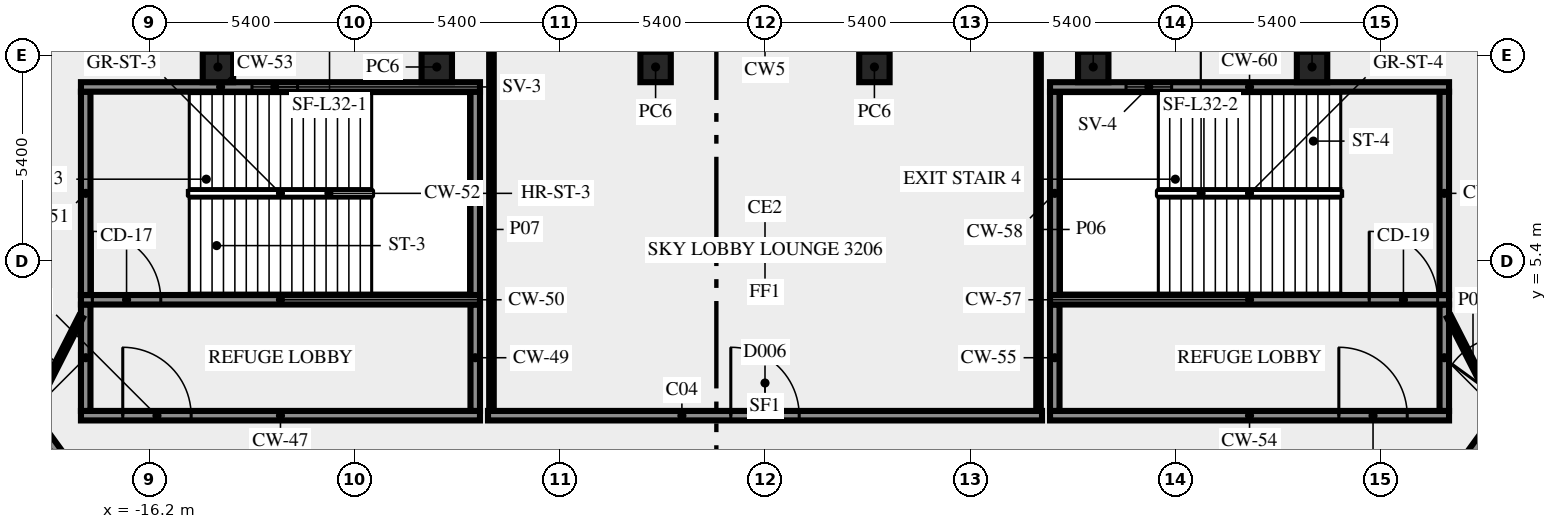
"""IFC4 building model, lengths in metres.
Left out: names, types, materials, properties, quantities, classifications, styles, units other than length and angle.
Written with IfcOpenShell. Run it as: python <this file> out.ifc"""

import sys

from ifc_helpers import new_model, si_unit, direction, frame, frame_2d, origin, origin_2d, place, context, subcontext, project, spatial, rectangle, extrude, element, fill, save


model = new_model("IFC4")
c1 = context("Model", 3, precision=1e-05, world=origin(), true_north=direction((0.0, 1.0)))
c2 = subcontext(c1, "Body", "Model", "MODEL_VIEW")
j1 = project(units=[si_unit("LENGTHUNIT", "METRE"), si_unit("PLANEANGLEUNIT", "RADIAN")], contexts=[c1])
p1 = place(None, origin())
s1 = spatial("IfcSite", under=j1, at=p1, CompositionType="ELEMENT")
p2 = place(p1, origin())
s2 = spatial("IfcBuilding", under=s1, at=p2, CompositionType="ELEMENT")
p3 = place(p2, frame((0.0, 0.0, 139.0)))
s3 = spatial("IfcBuildingStorey", under=s2, at=p3, CompositionType="ELEMENT", Elevation=139.0)
for number, where, z_axis, x_axis in (
    (1, (14.395, 10.5, 0.0), (0.0, 0.0, 1.0), (-1.0, 0.0, 0.0)),
    (2, (8.637, 10.5, 0.0), (0.0, 0.0, 1.0), (-1.0, 0.0, 0.0)),
    (3, (2.879, 10.5, 0.0), (0.0, 0.0, 1.0), (-1.0, 0.0, 0.0)),
    (4, (-2.879, 10.5, 0.0), (0.0, 0.0, 1.0), (-1.0, 0.0, 0.0)),
    (5, (-8.637, 10.5, 0.0), (0.0, 0.0, 1.0), (-1.0, 0.0, 0.0)),
    (6, (-14.395, 10.5, 0.0), (0.0, 0.0, 1.0), (-1.0, 0.0, 0.0)),
):
    element("IfcColumn", number, at=place(p3, frame(where, z_axis=z_axis, x_axis=x_axis)), inside=s3, PredefinedType="COLUMN", context=c2, shape_type="SweptSolid", body=[
        extrude(rectangle(XDim=0.8, YDim=0.8, at=origin_2d()), origin(), (0.0, 0.0, 1.0), 4.65),
    ])
p4 = place(p3, frame((-18.0, 1.325, 0.0), z_axis=(0.0, 0.0, 1.0), x_axis=(1.0, 0.0, 0.0)))
e7 = element("IfcWall", 7, at=p4, inside=s3, PredefinedType="SHEAR", context=c2, shape_type="SweptSolid", body=[
    extrude(rectangle(XDim=10.5, YDim=0.25, at=frame_2d((5.25, 0.0))), origin(), (0.0, 0.0, 1.0), 4.65),
])
p5 = place(p4, frame((1.1, 0.0, 0.0)))
e8 = element("IfcOpeningElement", 8, at=p5, cuts=e7, PredefinedType="OPENING", context=c2, shape_type="SweptSolid", body=[
    extrude(rectangle(XDim=1.8, YDim=2.1, at=frame_2d((0.9, 1.05))), frame((0.0, 0.135, 0.0), z_axis=(0.0, -1.0, 0.0), x_axis=(1.0, 0.0, 0.0)), (0.0, 0.0, 1.0), 0.27),
])
for number, where, z_axis, x_axis in (
    (9, (-17.875, 1.45, 0.0), (0.0, 0.0, 1.0), (0.0, 1.0, 0.0)),
    (10, (-7.625, 1.45, 0.0), (0.0, 0.0, 1.0), (0.0, 1.0, 0.0)),
):
    element("IfcWall", number, at=place(p3, frame(where, z_axis=z_axis, x_axis=x_axis)), inside=s3, PredefinedType="SHEAR", context=c2, shape_type="SweptSolid", body=[
        extrude(rectangle(XDim=2.8, YDim=0.25, at=frame_2d((1.4, 0.0))), origin(), (0.0, 0.0, 1.0), 4.65),
    ])
p6 = place(p3, frame((-18.0, 4.375, 0.0), z_axis=(0.0, 0.0, 1.0), x_axis=(1.0, 0.0, 0.0)))
e11 = element("IfcWall", 11, at=p6, inside=s3, PredefinedType="SHEAR", context=c2, shape_type="SweptSolid", body=[
    extrude(rectangle(XDim=10.5, YDim=0.25, at=frame_2d((5.25, 0.0))), origin(), (0.0, 0.0, 1.0), 4.65),
])
p7 = place(p6, frame((0.3, 0.0, 0.0)))
e12 = element("IfcOpeningElement", 12, at=p7, cuts=e11, PredefinedType="OPENING", context=c2, shape_type="SweptSolid", body=[
    extrude(rectangle(XDim=1.8, YDim=2.1, at=frame_2d((0.9, 1.05))), frame((0.0, 0.135, 0.0), z_axis=(0.0, -1.0, 0.0), x_axis=(1.0, 0.0, 0.0)), (0.0, 0.0, 1.0), 0.27),
])
for number, where, z_axis, x_axis in (
    (13, (-17.875, 4.5, 0.0), (0.0, 0.0, 1.0), (0.0, 1.0, 0.0)),
    (14, (-7.625, 4.5, 0.0), (0.0, 0.0, 1.0), (0.0, 1.0, 0.0)),
):
    element("IfcWall", number, at=place(p3, frame(where, z_axis=z_axis, x_axis=x_axis)), inside=s3, PredefinedType="SHEAR", context=c2, shape_type="SweptSolid", body=[
        extrude(rectangle(XDim=5.35, YDim=0.25, at=frame_2d((2.675, 0.0))), origin(), (0.0, 0.0, 1.0), 4.65),
    ])
p8 = place(p3, frame((-18.0, 9.975, 0.0), z_axis=(0.0, 0.0, 1.0), x_axis=(1.0, 0.0, 0.0)))
e15 = element("IfcWall", 15, at=p8, inside=s3, PredefinedType="SHEAR", context=c2, shape_type="SweptSolid", body=[
    extrude(rectangle(XDim=10.5, YDim=0.25, at=frame_2d((5.25, 0.0))), origin(), (0.0, 0.0, 1.0), 4.65),
])
p9 = place(p8, frame((4.5, 0.0, 1.0)))
e16 = element("IfcOpeningElement", 16, at=p9, cuts=e15, PredefinedType="OPENING", context=c2, shape_type="SweptSolid", body=[
    extrude(rectangle(XDim=1.2, YDim=1.2, at=frame_2d((0.6, 0.6))), frame((0.0, 0.135, 0.0), z_axis=(0.0, -1.0, 0.0), x_axis=(1.0, 0.0, 0.0)), (0.0, 0.0, 1.0), 0.27),
])
p10 = place(p3, frame((7.5, 1.325, 0.0), z_axis=(0.0, 0.0, 1.0), x_axis=(1.0, 0.0, 0.0)))
e17 = element("IfcWall", 17, at=p10, inside=s3, PredefinedType="SHEAR", context=c2, shape_type="SweptSolid", body=[
    extrude(rectangle(XDim=10.5, YDim=0.25, at=frame_2d((5.25, 0.0))), origin(), (0.0, 0.0, 1.0), 4.65),
])
p11 = place(p10, frame((7.6, 0.0, 0.0)))
e18 = element("IfcOpeningElement", 18, at=p11, cuts=e17, PredefinedType="OPENING", context=c2, shape_type="SweptSolid", body=[
    extrude(rectangle(XDim=1.8, YDim=2.1, at=frame_2d((0.9, 1.05))), frame((0.0, 0.135, 0.0), z_axis=(0.0, -1.0, 0.0), x_axis=(1.0, 0.0, 0.0)), (0.0, 0.0, 1.0), 0.27),
])
for number, where, z_axis, x_axis in (
    (19, (7.625, 1.45, 0.0), (0.0, 0.0, 1.0), (0.0, 1.0, 0.0)),
    (20, (17.875, 1.45, 0.0), (0.0, 0.0, 1.0), (0.0, 1.0, 0.0)),
):
    element("IfcWall", number, at=place(p3, frame(where, z_axis=z_axis, x_axis=x_axis)), inside=s3, PredefinedType="SHEAR", context=c2, shape_type="SweptSolid", body=[
        extrude(rectangle(XDim=2.8, YDim=0.25, at=frame_2d((1.4, 0.0))), origin(), (0.0, 0.0, 1.0), 4.65),
    ])
p12 = place(p3, frame((7.5, 4.375, 0.0), z_axis=(0.0, 0.0, 1.0), x_axis=(1.0, 0.0, 0.0)))
e21 = element("IfcWall", 21, at=p12, inside=s3, PredefinedType="SHEAR", context=c2, shape_type="SweptSolid", body=[
    extrude(rectangle(XDim=10.5, YDim=0.25, at=frame_2d((5.25, 0.0))), origin(), (0.0, 0.0, 1.0), 4.65),
])
p13 = place(p12, frame((8.4, 0.0, 0.0)))
e22 = element("IfcOpeningElement", 22, at=p13, cuts=e21, PredefinedType="OPENING", context=c2, shape_type="SweptSolid", body=[
    extrude(rectangle(XDim=1.8, YDim=2.1, at=frame_2d((0.9, 1.05))), frame((0.0, 0.135, 0.0), z_axis=(0.0, -1.0, 0.0), x_axis=(1.0, 0.0, 0.0)), (0.0, 0.0, 1.0), 0.27),
])
for number, where, z_axis, x_axis in (
    (23, (7.625, 4.5, 0.0), (0.0, 0.0, 1.0), (0.0, 1.0, 0.0)),
    (24, (17.875, 4.5, 0.0), (0.0, 0.0, 1.0), (0.0, 1.0, 0.0)),
):
    element("IfcWall", number, at=place(p3, frame(where, z_axis=z_axis, x_axis=x_axis)), inside=s3, PredefinedType="SHEAR", context=c2, shape_type="SweptSolid", body=[
        extrude(rectangle(XDim=5.35, YDim=0.25, at=frame_2d((2.675, 0.0))), origin(), (0.0, 0.0, 1.0), 4.65),
    ])
p14 = place(p3, frame((7.5, 9.975, 0.0), z_axis=(0.0, 0.0, 1.0), x_axis=(1.0, 0.0, 0.0)))
e25 = element("IfcWall", 25, at=p14, inside=s3, PredefinedType="SHEAR", context=c2, shape_type="SweptSolid", body=[
    extrude(rectangle(XDim=10.5, YDim=0.25, at=frame_2d((5.25, 0.0))), origin(), (0.0, 0.0, 1.0), 4.65),
])
p15 = place(p14, frame((2.0, 0.0, 1.0)))
e26 = element("IfcOpeningElement", 26, at=p15, cuts=e25, PredefinedType="OPENING", context=c2, shape_type="SweptSolid", body=[
    extrude(rectangle(XDim=1.2, YDim=1.2, at=frame_2d((0.6, 0.6))), frame((0.0, 0.135, 0.0), z_axis=(0.0, -1.0, 0.0), x_axis=(1.0, 0.0, 0.0)), (0.0, 0.0, 1.0), 0.27),
])
p16 = place(p3, frame((-38.32, 27.469, 0.0), z_axis=(0.0, 0.0, 1.0), x_axis=(0.587788021768, -0.809014982226, 0.0)))
e27 = element("IfcWall", 27, at=p16, inside=s3, PredefinedType="SOLIDWALL", context=c2, shape_type="SweptSolid", body=[
    extrude(rectangle(XDim=35.344, YDim=0.25, at=frame_2d((17.672, 0.0))), origin(), (0.0, 0.0, 1.0), 4.65),
])
p17 = place(p16, frame((31.052, 0.0, 0.0)))
e28 = element("IfcOpeningElement", 28, at=p17, cuts=e27, PredefinedType="OPENING", context=c2, shape_type="SweptSolid", body=[
    extrude(rectangle(XDim=0.9, YDim=2.1, at=frame_2d((0.45, 1.05))), frame((0.0, 0.135, 0.0), z_axis=(0.0, -1.0, 0.0), x_axis=(1.0, 0.0, 0.0)), (0.0, 0.0, 1.0), 0.27),
])
p18 = place(p16, frame((0.392, 0.0, 0.0)))
e29 = element("IfcOpeningElement", 29, at=p18, cuts=e27, PredefinedType="OPENING", context=c2, shape_type="SweptSolid", body=[
    extrude(rectangle(XDim=0.9, YDim=2.1, at=frame_2d((0.45, 1.05))), frame((0.0, 0.135, 0.0), z_axis=(0.0, -1.0, 0.0), x_axis=(1.0, 0.0, 0.0)), (0.0, 0.0, 1.0), 0.27),
])
p19 = place(p3, frame((-7.289, 1.325, 0.0), z_axis=(0.0, 0.0, 1.0), x_axis=(1.0, 0.0, 0.0)))
e30 = element("IfcWall", 30, at=p19, inside=s3, PredefinedType="SOLIDWALL", context=c2, shape_type="SweptSolid", body=[
    extrude(rectangle(XDim=14.579, YDim=0.25, at=frame_2d((7.289, 0.0))), origin(), (0.0, 0.0, 1.0), 4.65),
])
p20 = place(p19, frame((6.389, 0.0, 0.0)))
e31 = element("IfcOpeningElement", 31, at=p20, cuts=e30, PredefinedType="OPENING", context=c2, shape_type="SweptSolid", body=[
    extrude(rectangle(XDim=1.8, YDim=2.1, at=frame_2d((0.9, 1.05))), frame((0.0, 0.135, 0.0), z_axis=(0.0, -1.0, 0.0), x_axis=(1.0, 0.0, 0.0)), (0.0, 0.0, 1.0), 0.27),
])
p21 = place(p3, frame((17.545, -1.125, 0.0), z_axis=(0.0, 0.0, 1.0), x_axis=(0.587788021768, 0.809014982226, 0.0)))
e32 = element("IfcWall", 32, at=p21, inside=s3, PredefinedType="SOLIDWALL", context=c2, shape_type="SweptSolid", body=[
    extrude(rectangle(XDim=35.344, YDim=0.25, at=frame_2d((17.672, 0.0))), origin(), (0.0, 0.0, 1.0), 4.65),
])
p22 = place(p21, frame((33.153, 0.0, 0.0)))
e33 = element("IfcOpeningElement", 33, at=p22, cuts=e32, PredefinedType="OPENING", context=c2, shape_type="SweptSolid", body=[
    extrude(rectangle(XDim=1.8, YDim=2.1, at=frame_2d((0.9, 1.05))), frame((0.0, 0.135, 0.0), z_axis=(0.0, -1.0, 0.0), x_axis=(1.0, 0.0, 0.0)), (0.0, 0.0, 1.0), 0.27),
])
p23 = place(p21, frame((3.392, 0.0, 0.0)))
e34 = element("IfcOpeningElement", 34, at=p23, cuts=e32, PredefinedType="OPENING", context=c2, shape_type="SweptSolid", body=[
    extrude(rectangle(XDim=1.8, YDim=2.1, at=frame_2d((0.9, 1.05))), frame((0.0, 0.135, 0.0), z_axis=(0.0, -1.0, 0.0), x_axis=(1.0, 0.0, 0.0)), (0.0, 0.0, 1.0), 0.27),
])
for number, where, z_axis, x_axis in (
    (35, (18.0, 3.925, 0.0), (0.0, 0.0, 1.0), (0.454, -0.891, 0.0)),
    (36, (-19.261, 1.45, 0.0), (0.0, 0.0, 1.0), (0.454, 0.891, 0.0)),
):
    element("IfcWall", number, at=place(p3, frame(where, z_axis=z_axis, x_axis=x_axis)), inside=s3, PredefinedType="PARTITIONING", context=c2, shape_type="SweptSolid", body=[
        extrude(rectangle(XDim=2.778, YDim=0.12, at=frame_2d((1.389, 0.0))), origin(), (0.0, 0.0, 1.0), 4.65),
    ])
for number, where, z_axis, x_axis in (
    (37, (7.198, 1.45, 0.0), (0.0, 0.0, 1.0), (0.0, 1.0, 0.0)),
    (38, (-7.198, 11.0, 0.0), (0.0, 0.0, 1.0), (0.0, -1.0, 0.0)),
):
    element("IfcWall", number, at=place(p3, frame(where, z_axis=z_axis, x_axis=x_axis)), inside=s3, PredefinedType="PARTITIONING", context=c2, shape_type="SweptSolid", body=[
        extrude(rectangle(XDim=9.55, YDim=0.12, at=frame_2d((4.775, 0.0))), origin(), (0.0, 0.0, 1.0), 3.85),
    ])
p24 = place(p5, origin())
e39 = element("IfcDoor", 39, at=p24, inside=s3, OperationType="DOUBLE_DOOR_SINGLE_SWING", PredefinedType="DOOR", context=c2, shape_type="SweptSolid", body=[
    extrude(rectangle(XDim=1.8, YDim=2.1, at=frame_2d((0.9, 1.05))), frame((0.0, 0.025, 0.0), z_axis=(0.0, -1.0, 0.0), x_axis=(1.0, 0.0, 0.0)), (0.0, 0.0, 1.0), 0.05),
])
fill(e8, e39)
p25 = place(p7, origin())
e40 = element("IfcDoor", 40, at=p25, inside=s3, OperationType="DOUBLE_DOOR_SINGLE_SWING", PredefinedType="DOOR", context=c2, shape_type="SweptSolid", body=[
    extrude(rectangle(XDim=1.8, YDim=2.1, at=frame_2d((0.9, 1.05))), frame((0.0, 0.025, 0.0), z_axis=(0.0, -1.0, 0.0), x_axis=(1.0, 0.0, 0.0)), (0.0, 0.0, 1.0), 0.05),
])
fill(e12, e40)
p26 = place(p9, origin())
e41 = element("IfcWindow", 41, at=p26, inside=s3, PartitioningType="SINGLE_PANEL", PredefinedType="WINDOW", context=c2, shape_type="SweptSolid", body=[
    extrude(rectangle(XDim=1.2, YDim=1.2, at=frame_2d((0.6, 0.6))), frame((0.0, 0.03, 0.0), z_axis=(0.0, -1.0, 0.0), x_axis=(1.0, 0.0, 0.0)), (0.0, 0.0, 1.0), 0.06),
])
fill(e16, e41)
p27 = place(p11, origin())
e42 = element("IfcDoor", 42, at=p27, inside=s3, OperationType="DOUBLE_DOOR_SINGLE_SWING", PredefinedType="DOOR", context=c2, shape_type="SweptSolid", body=[
    extrude(rectangle(XDim=1.8, YDim=2.1, at=frame_2d((0.9, 1.05))), frame((0.0, 0.025, 0.0), z_axis=(0.0, -1.0, 0.0), x_axis=(1.0, 0.0, 0.0)), (0.0, 0.0, 1.0), 0.05),
])
fill(e18, e42)
p28 = place(p13, origin())
e43 = element("IfcDoor", 43, at=p28, inside=s3, OperationType="DOUBLE_DOOR_SINGLE_SWING", PredefinedType="DOOR", context=c2, shape_type="SweptSolid", body=[
    extrude(rectangle(XDim=1.8, YDim=2.1, at=frame_2d((0.9, 1.05))), frame((0.0, 0.025, 0.0), z_axis=(0.0, -1.0, 0.0), x_axis=(1.0, 0.0, 0.0)), (0.0, 0.0, 1.0), 0.05),
])
fill(e22, e43)
p29 = place(p15, origin())
e44 = element("IfcWindow", 44, at=p29, inside=s3, PartitioningType="SINGLE_PANEL", PredefinedType="WINDOW", context=c2, shape_type="SweptSolid", body=[
    extrude(rectangle(XDim=1.2, YDim=1.2, at=frame_2d((0.6, 0.6))), frame((0.0, 0.03, 0.0), z_axis=(0.0, -1.0, 0.0), x_axis=(1.0, 0.0, 0.0)), (0.0, 0.0, 1.0), 0.06),
])
fill(e26, e44)
p30 = place(p20, origin())
e45 = element("IfcDoor", 45, at=p30, inside=s3, OperationType="DOUBLE_DOOR_SINGLE_SWING", PredefinedType="DOOR", context=c2, shape_type="SweptSolid", body=[
    extrude(rectangle(XDim=1.8, YDim=2.1, at=frame_2d((0.9, 1.05))), frame((0.0, 0.025, 0.0), z_axis=(0.0, -1.0, 0.0), x_axis=(1.0, 0.0, 0.0)), (0.0, 0.0, 1.0), 0.05),
])
fill(e31, e45)
save(model, sys.argv[1])
